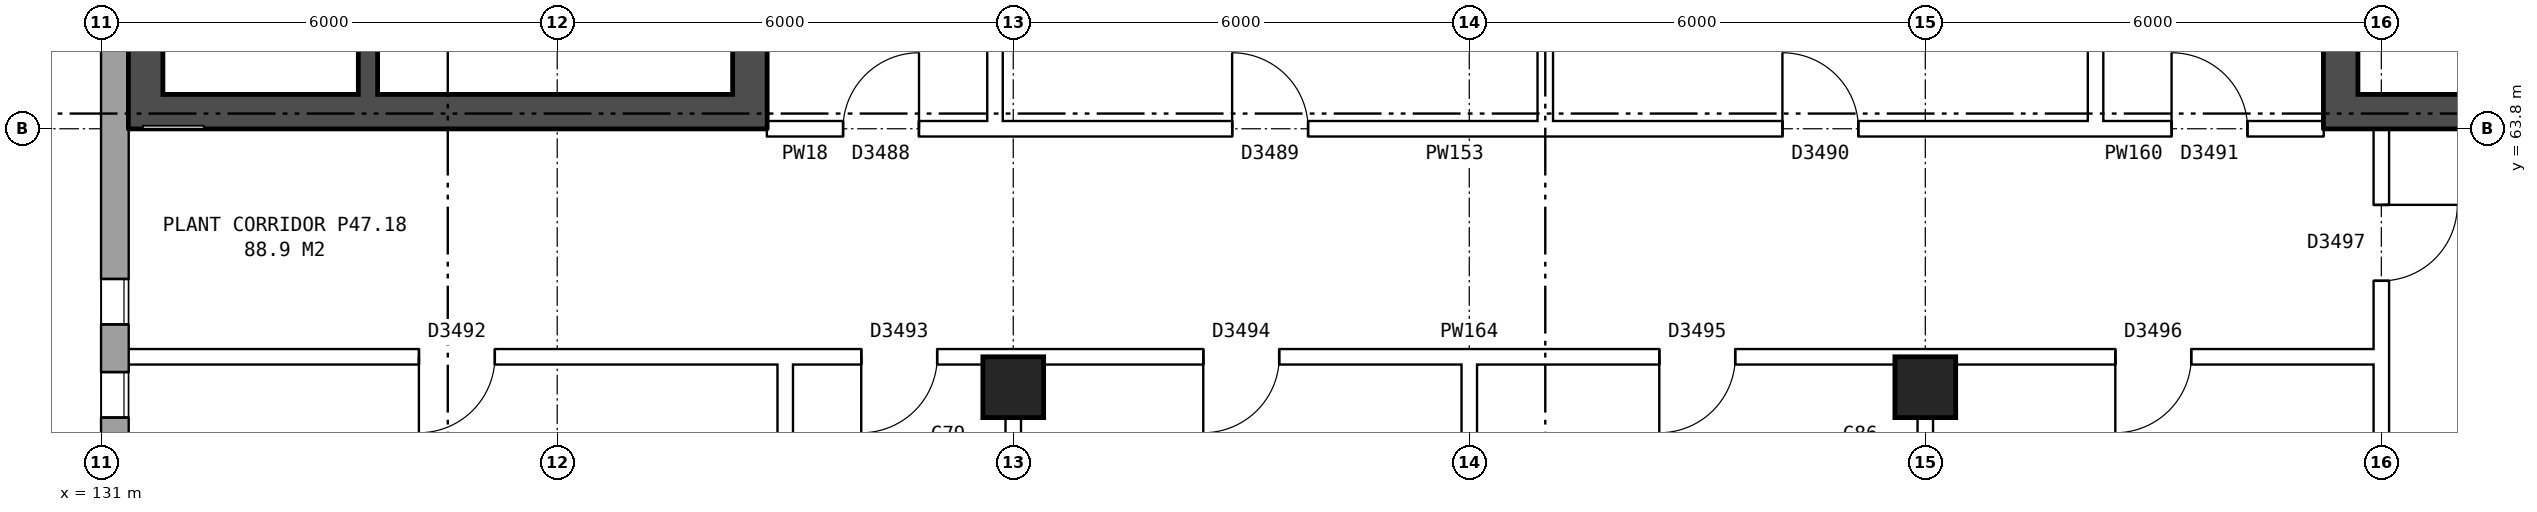
"""IFC4 building model, lengths in metres.
Left out: names, types, materials, properties, quantities, classifications, styles, units other than length and angle.
Written with IfcOpenShell. Run it as: python <this file> out.ifc"""

import sys

from ifc_helpers import new_model, si_unit, direction, frame, frame_2d, origin, origin_2d, place, context, subcontext, project, spatial, rectangle, extrude, element, fill, save


model = new_model("IFC4")
c1 = context("Model", 3, precision=1e-05, world=origin(), true_north=direction((0.0, 1.0)))
c2 = subcontext(c1, "Body", "Model", "MODEL_VIEW")
j1 = project(units=[si_unit("LENGTHUNIT", "METRE"), si_unit("PLANEANGLEUNIT", "RADIAN")], contexts=[c1])
p1 = place(None, origin())
s1 = spatial("IfcSite", under=j1, at=p1, CompositionType="ELEMENT")
p2 = place(p1, origin())
s2 = spatial("IfcBuilding", under=s1, at=p2, CompositionType="ELEMENT")
p3 = place(p2, frame((0.0, 0.0, 167.1)))
s3 = spatial("IfcBuildingStorey", under=s2, at=p3, CompositionType="ELEMENT", Elevation=167.1)
for number, where, z_axis, x_axis in (
    (1, (143.0, 60.4, 0.0), (0.0, 0.0, 1.0), (1.0, 0.0, 0.0)),
    (2, (155.0, 60.4, 0.0), (0.0, 0.0, 1.0), (1.0, 0.0, 0.0)),
):
    element("IfcColumn", number, at=place(p3, frame(where, z_axis=z_axis, x_axis=x_axis)), inside=s3, PredefinedType="COLUMN", context=c2, shape_type="SweptSolid", body=[
        extrude(rectangle(XDim=0.8, YDim=0.8, at=origin_2d()), origin(), (0.0, 0.0, 1.0), 4.2),
    ])
p4 = place(p3, frame((131.18, 82.925, 0.0), z_axis=(0.0, 0.0, 1.0), x_axis=(0.0, -1.0, 0.0)))
e3 = element("IfcWall", 3, at=p4, inside=s3, PredefinedType="STANDARD", context=c2, shape_type="SweptSolid", body=[
    extrude(rectangle(XDim=25.851, YDim=0.36, at=frame_2d((12.925, 0.0))), origin(), (0.0, 0.0, 1.0), 4.2),
])
p5 = place(p4, frame((2.9, 0.0, 1.5)))
e4 = element("IfcOpeningElement", 4, at=p5, cuts=e3, PredefinedType="OPENING", context=c2, shape_type="SweptSolid", body=[
    extrude(rectangle(XDim=0.6, YDim=1.2, at=frame_2d((0.3, 0.6))), frame((0.0, 0.19, 0.0), z_axis=(0.0, -1.0, 0.0), x_axis=(1.0, 0.0, 0.0)), (0.0, 0.0, 1.0), 0.38),
])
p6 = place(p4, frame((4.625, 0.0, 1.5)))
e5 = element("IfcOpeningElement", 5, at=p6, cuts=e3, PredefinedType="OPENING", context=c2, shape_type="SweptSolid", body=[
    extrude(rectangle(XDim=1.6, YDim=1.2, at=frame_2d((0.8, 0.6))), frame((0.0, 0.19, 0.0), z_axis=(0.0, -1.0, 0.0), x_axis=(1.0, 0.0, 0.0)), (0.0, 0.0, 1.0), 0.38),
])
p7 = place(p4, frame((21.1, 0.0, 1.5)))
e6 = element("IfcOpeningElement", 6, at=p7, cuts=e3, PredefinedType="OPENING", context=c2, shape_type="SweptSolid", body=[
    extrude(rectangle(XDim=0.6, YDim=1.2, at=frame_2d((0.3, 0.6))), frame((0.0, 0.19, 0.0), z_axis=(0.0, -1.0, 0.0), x_axis=(1.0, 0.0, 0.0)), (0.0, 0.0, 1.0), 0.38),
])
p8 = place(p4, frame((22.325, 0.0, 1.5)))
e7 = element("IfcOpeningElement", 7, at=p8, cuts=e3, PredefinedType="OPENING", context=c2, shape_type="SweptSolid", body=[
    extrude(rectangle(XDim=0.6, YDim=1.2, at=frame_2d((0.3, 0.6))), frame((0.0, 0.19, 0.0), z_axis=(0.0, -1.0, 0.0), x_axis=(1.0, 0.0, 0.0)), (0.0, 0.0, 1.0), 0.38),
])
p9 = place(p3, frame((139.535, 63.8, 0.0), z_axis=(0.0, 0.0, 1.0), x_axis=(0.0, 1.0, 0.0)))
e8 = element("IfcWall", 8, at=p9, inside=s3, PredefinedType="SHEAR", context=c2, shape_type="SweptSolid", body=[
    extrude(rectangle(XDim=12.4, YDim=0.45, at=frame_2d((6.2, 0.0))), origin(), (0.0, 0.0, 1.0), 4.2),
])
p10 = place(p9, frame((1.325, 0.0, 0.0)))
e9 = element("IfcOpeningElement", 9, at=p10, cuts=e8, PredefinedType="OPENING", context=c2, shape_type="SweptSolid", body=[
    extrude(rectangle(XDim=1.1, YDim=2.1, at=frame_2d((0.55, 1.05))), frame((0.0, 0.235, 0.0), z_axis=(0.0, -1.0, 0.0), x_axis=(1.0, 0.0, 0.0)), (0.0, 0.0, 1.0), 0.47),
])
p11 = place(p9, frame((3.6, 0.0, 0.0)))
e10 = element("IfcOpeningElement", 10, at=p11, cuts=e8, PredefinedType="OPENING", context=c2, shape_type="SweptSolid", body=[
    extrude(rectangle(XDim=1.1, YDim=2.1, at=frame_2d((0.55, 1.05))), frame((0.0, 0.235, 0.0), z_axis=(0.0, -1.0, 0.0), x_axis=(1.0, 0.0, 0.0)), (0.0, 0.0, 1.0), 0.47),
])
p12 = place(p9, frame((5.8, 0.0, 0.0)))
e11 = element("IfcOpeningElement", 11, at=p12, cuts=e8, PredefinedType="OPENING", context=c2, shape_type="SweptSolid", body=[
    extrude(rectangle(XDim=1.1, YDim=2.1, at=frame_2d((0.55, 1.05))), frame((0.0, 0.235, 0.0), z_axis=(0.0, -1.0, 0.0), x_axis=(1.0, 0.0, 0.0)), (0.0, 0.0, 1.0), 0.47),
])
p13 = place(p9, frame((9.9, 0.0, 0.0)))
e12 = element("IfcOpeningElement", 12, at=p13, cuts=e8, PredefinedType="OPENING", context=c2, shape_type="SweptSolid", body=[
    extrude(rectangle(XDim=1.1, YDim=2.1, at=frame_2d((0.55, 1.05))), frame((0.0, 0.235, 0.0), z_axis=(0.0, -1.0, 0.0), x_axis=(1.0, 0.0, 0.0)), (0.0, 0.0, 1.0), 0.47),
])
p14 = place(p9, frame((8.125, 0.0, 0.0)))
e13 = element("IfcOpeningElement", 13, at=p14, cuts=e8, PredefinedType="OPENING", context=c2, shape_type="SweptSolid", body=[
    extrude(rectangle(XDim=0.85, YDim=2.1, at=frame_2d((0.425, 1.05))), frame((0.0, 0.235, 0.0), z_axis=(0.0, -1.0, 0.0), x_axis=(1.0, 0.0, 0.0)), (0.0, 0.0, 1.0), 0.47),
])
p15 = place(p3, frame((131.585, 63.8, 0.0), z_axis=(0.0, 0.0, 1.0), x_axis=(0.0, 1.0, 0.0)))
e14 = element("IfcWall", 14, at=p15, inside=s3, PredefinedType="SHEAR", context=c2, shape_type="SweptSolid", body=[
    extrude(rectangle(XDim=12.4, YDim=0.45, at=frame_2d((6.2, 0.0))), origin(), (0.0, 0.0, 1.0), 4.2),
])
p16 = place(p3, frame((139.31, 64.025, 0.0), z_axis=(0.0, 0.0, 1.0), x_axis=(-1.0, 0.0, 0.0)))
e15 = element("IfcWall", 15, at=p16, inside=s3, PredefinedType="SHEAR", context=c2, shape_type="SweptSolid", body=[
    extrude(rectangle(XDim=7.5, YDim=0.45, at=frame_2d((3.75, 0.0))), origin(), (0.0, 0.0, 1.0), 4.2),
])
p17 = place(p3, frame((134.51, 64.25, 0.0), z_axis=(0.0, 0.0, 1.0), x_axis=(0.0, 1.0, 0.0)))
e16 = element("IfcWall", 16, at=p17, inside=s3, PredefinedType="SHEAR", context=c2, shape_type="SweptSolid", body=[
    extrude(rectangle(XDim=6.875, YDim=0.25, at=frame_2d((3.438, 0.0))), origin(), (0.0, 0.0, 1.0), 4.2),
])
p18 = place(p3, frame((142.76, 63.9, 0.0), z_axis=(0.0, 0.0, 1.0), x_axis=(0.0, 1.0, 0.0)))
e17 = element("IfcWall", 17, at=p18, inside=s3, PredefinedType="PARTITIONING", context=c2, shape_type="SweptSolid", body=[
    extrude(rectangle(XDim=12.2, YDim=0.2, at=frame_2d((6.1, 0.0))), origin(), (0.0, 0.0, 1.0), 4.2),
])
p19 = place(p18, frame((5.1, 0.0, 0.0)))
e18 = element("IfcOpeningElement", 18, at=p19, cuts=e17, PredefinedType="OPENING", context=c2, shape_type="SweptSolid", body=[
    extrude(rectangle(XDim=2.0, YDim=2.1, at=frame_2d((1.0, 1.05))), frame((0.0, 0.11, 0.0), z_axis=(0.0, -1.0, 0.0), x_axis=(1.0, 0.0, 0.0)), (0.0, 0.0, 1.0), 0.22),
])
p20 = place(p3, frame((160.465, 76.2, 0.0), z_axis=(0.0, 0.0, 1.0), x_axis=(0.0, -1.0, 0.0)))
e19 = element("IfcWall", 19, at=p20, inside=s3, PredefinedType="SHEAR", context=c2, shape_type="SweptSolid", body=[
    extrude(rectangle(XDim=12.4, YDim=0.45, at=frame_2d((6.2, 0.0))), origin(), (0.0, 0.0, 1.0), 4.2),
])
p21 = place(p20, frame((1.325, 0.0, 0.0)))
e20 = element("IfcOpeningElement", 20, at=p21, cuts=e19, PredefinedType="OPENING", context=c2, shape_type="SweptSolid", body=[
    extrude(rectangle(XDim=1.1, YDim=2.1, at=frame_2d((0.55, 1.05))), frame((0.0, 0.235, 0.0), z_axis=(0.0, -1.0, 0.0), x_axis=(1.0, 0.0, 0.0)), (0.0, 0.0, 1.0), 0.47),
])
p22 = place(p20, frame((4.025, 0.0, 0.0)))
e21 = element("IfcOpeningElement", 21, at=p22, cuts=e19, PredefinedType="OPENING", context=c2, shape_type="SweptSolid", body=[
    extrude(rectangle(XDim=0.85, YDim=2.1, at=frame_2d((0.425, 1.05))), frame((0.0, 0.235, 0.0), z_axis=(0.0, -1.0, 0.0), x_axis=(1.0, 0.0, 0.0)), (0.0, 0.0, 1.0), 0.47),
])
p23 = place(p20, frame((6.175, 0.0, 0.0)))
e22 = element("IfcOpeningElement", 22, at=p23, cuts=e19, PredefinedType="OPENING", context=c2, shape_type="SweptSolid", body=[
    extrude(rectangle(XDim=0.85, YDim=2.1, at=frame_2d((0.425, 1.05))), frame((0.0, 0.235, 0.0), z_axis=(0.0, -1.0, 0.0), x_axis=(1.0, 0.0, 0.0)), (0.0, 0.0, 1.0), 0.47),
])
p24 = place(p20, frame((9.9, 0.0, 0.0)))
e23 = element("IfcOpeningElement", 23, at=p24, cuts=e19, PredefinedType="OPENING", context=c2, shape_type="SweptSolid", body=[
    extrude(rectangle(XDim=1.1, YDim=2.1, at=frame_2d((0.55, 1.05))), frame((0.0, 0.235, 0.0), z_axis=(0.0, -1.0, 0.0), x_axis=(1.0, 0.0, 0.0)), (0.0, 0.0, 1.0), 0.47),
])
p25 = place(p20, frame((8.125, 0.0, 0.0)))
e24 = element("IfcOpeningElement", 24, at=p25, cuts=e19, PredefinedType="OPENING", context=c2, shape_type="SweptSolid", body=[
    extrude(rectangle(XDim=0.85, YDim=2.1, at=frame_2d((0.425, 1.05))), frame((0.0, 0.235, 0.0), z_axis=(0.0, -1.0, 0.0), x_axis=(1.0, 0.0, 0.0)), (0.0, 0.0, 1.0), 0.47),
])
p26 = place(p3, frame((160.69, 64.025, 0.0), z_axis=(0.0, 0.0, 1.0), x_axis=(1.0, 0.0, 0.0)))
e25 = element("IfcWall", 25, at=p26, inside=s3, PredefinedType="SHEAR", context=c2, shape_type="SweptSolid", body=[
    extrude(rectangle(XDim=7.5, YDim=0.45, at=frame_2d((3.75, 0.0))), origin(), (0.0, 0.0, 1.0), 4.2),
])
p27 = place(p3, frame((157.24, 63.9, 0.0), z_axis=(0.0, 0.0, 1.0), x_axis=(0.0, 1.0, 0.0)))
e26 = element("IfcWall", 26, at=p27, inside=s3, PredefinedType="PARTITIONING", context=c2, shape_type="SweptSolid", body=[
    extrude(rectangle(XDim=12.2, YDim=0.2, at=frame_2d((6.1, 0.0))), origin(), (0.0, 0.0, 1.0), 4.2),
])
p28 = place(p27, frame((5.1, 0.0, 0.0)))
e27 = element("IfcOpeningElement", 27, at=p28, cuts=e26, PredefinedType="OPENING", context=c2, shape_type="SweptSolid", body=[
    extrude(rectangle(XDim=2.0, YDim=2.1, at=frame_2d((1.0, 1.05))), frame((0.0, 0.11, 0.0), z_axis=(0.0, -1.0, 0.0), x_axis=(1.0, 0.0, 0.0)), (0.0, 0.0, 1.0), 0.22),
])
p29 = place(p3, frame((131.24, 60.8, 0.0), z_axis=(0.0, 0.0, 1.0), x_axis=(1.0, 0.0, 0.0)))
e28 = element("IfcWall", 28, at=p29, inside=s3, PredefinedType="PARTITIONING", context=c2, shape_type="SweptSolid", body=[
    extrude(rectangle(XDim=29.86, YDim=0.2, at=frame_2d((14.93, 0.0))), origin(), (0.0, 0.0, 1.0), 4.2),
])
p30 = place(p29, frame((3.94, 0.0, 0.0)))
e29 = element("IfcOpeningElement", 29, at=p30, cuts=e28, PredefinedType="OPENING", context=c2, shape_type="SweptSolid", body=[
    extrude(rectangle(XDim=1.0, YDim=2.1, at=frame_2d((0.5, 1.05))), frame((0.0, 0.11, 0.0), z_axis=(0.0, -1.0, 0.0), x_axis=(1.0, 0.0, 0.0)), (0.0, 0.0, 1.0), 0.22),
])
p31 = place(p29, frame((9.76, 0.0, 0.0)))
e30 = element("IfcOpeningElement", 30, at=p31, cuts=e28, PredefinedType="OPENING", context=c2, shape_type="SweptSolid", body=[
    extrude(rectangle(XDim=1.0, YDim=2.1, at=frame_2d((0.5, 1.05))), frame((0.0, 0.11, 0.0), z_axis=(0.0, -1.0, 0.0), x_axis=(1.0, 0.0, 0.0)), (0.0, 0.0, 1.0), 0.22),
])
p32 = place(p29, frame((14.26, 0.0, 0.0)))
e31 = element("IfcOpeningElement", 31, at=p32, cuts=e28, PredefinedType="OPENING", context=c2, shape_type="SweptSolid", body=[
    extrude(rectangle(XDim=1.0, YDim=2.1, at=frame_2d((0.5, 1.05))), frame((0.0, 0.11, 0.0), z_axis=(0.0, -1.0, 0.0), x_axis=(1.0, 0.0, 0.0)), (0.0, 0.0, 1.0), 0.22),
])
p33 = place(p29, frame((20.26, 0.0, 0.0)))
e32 = element("IfcOpeningElement", 32, at=p33, cuts=e28, PredefinedType="OPENING", context=c2, shape_type="SweptSolid", body=[
    extrude(rectangle(XDim=1.0, YDim=2.1, at=frame_2d((0.5, 1.05))), frame((0.0, 0.11, 0.0), z_axis=(0.0, -1.0, 0.0), x_axis=(1.0, 0.0, 0.0)), (0.0, 0.0, 1.0), 0.22),
])
p34 = place(p29, frame((26.26, 0.0, 0.0)))
e33 = element("IfcOpeningElement", 33, at=p34, cuts=e28, PredefinedType="OPENING", context=c2, shape_type="SweptSolid", body=[
    extrude(rectangle(XDim=1.0, YDim=2.1, at=frame_2d((0.5, 1.05))), frame((0.0, 0.11, 0.0), z_axis=(0.0, -1.0, 0.0), x_axis=(1.0, 0.0, 0.0)), (0.0, 0.0, 1.0), 0.22),
])
p35 = place(p3, frame((142.76, 63.8, 0.0), z_axis=(0.0, 0.0, 1.0), x_axis=(1.0, 0.0, 0.0)))
e34 = element("IfcWall", 34, at=p35, inside=s3, PredefinedType="PARTITIONING", context=c2, shape_type="SweptSolid", body=[
    extrude(rectangle(XDim=14.48, YDim=0.2, at=frame_2d((7.24, 0.0))), origin(), (0.0, 0.0, 1.0), 4.2),
])
p36 = place(p35, frame((3.12, 0.0, 0.0)))
e35 = element("IfcOpeningElement", 35, at=p36, cuts=e34, PredefinedType="OPENING", context=c2, shape_type="SweptSolid", body=[
    extrude(rectangle(XDim=1.0, YDim=2.1, at=frame_2d((0.5, 1.05))), frame((0.0, 0.11, 0.0), z_axis=(0.0, -1.0, 0.0), x_axis=(1.0, 0.0, 0.0)), (0.0, 0.0, 1.0), 0.22),
])
p37 = place(p35, frame((10.36, 0.0, 0.0)))
e36 = element("IfcOpeningElement", 36, at=p37, cuts=e34, PredefinedType="OPENING", context=c2, shape_type="SweptSolid", body=[
    extrude(rectangle(XDim=1.0, YDim=2.1, at=frame_2d((0.5, 1.05))), frame((0.0, 0.11, 0.0), z_axis=(0.0, -1.0, 0.0), x_axis=(1.0, 0.0, 0.0)), (0.0, 0.0, 1.0), 0.22),
])
p38 = place(p3, frame((139.76, 63.8, 0.0), z_axis=(0.0, 0.0, 1.0), x_axis=(1.0, 0.0, 0.0)))
e37 = element("IfcWall", 37, at=p38, inside=s3, PredefinedType="PARTITIONING", context=c2, shape_type="SweptSolid", body=[
    extrude(rectangle(XDim=3.0, YDim=0.2, at=frame_2d((1.5, 0.0))), origin(), (0.0, 0.0, 1.0), 4.2),
])
p39 = place(p38, frame((1.0, 0.0, 0.0)))
e38 = element("IfcOpeningElement", 38, at=p39, cuts=e37, PredefinedType="OPENING", context=c2, shape_type="SweptSolid", body=[
    extrude(rectangle(XDim=1.0, YDim=2.1, at=frame_2d((0.5, 1.05))), frame((0.0, 0.11, 0.0), z_axis=(0.0, -1.0, 0.0), x_axis=(1.0, 0.0, 0.0)), (0.0, 0.0, 1.0), 0.22),
])
p40 = place(p3, frame((157.24, 63.8, 0.0), z_axis=(0.0, 0.0, 1.0), x_axis=(1.0, 0.0, 0.0)))
e39 = element("IfcWall", 39, at=p40, inside=s3, PredefinedType="PARTITIONING", context=c2, shape_type="SweptSolid", body=[
    extrude(rectangle(XDim=3.0, YDim=0.2, at=frame_2d((1.5, 0.0))), origin(), (0.0, 0.0, 1.0), 4.2),
])
p41 = place(p40, frame((1.0, 0.0, 0.0)))
e40 = element("IfcOpeningElement", 40, at=p41, cuts=e39, PredefinedType="OPENING", context=c2, shape_type="SweptSolid", body=[
    extrude(rectangle(XDim=1.0, YDim=2.1, at=frame_2d((0.5, 1.05))), frame((0.0, 0.11, 0.0), z_axis=(0.0, -1.0, 0.0), x_axis=(1.0, 0.0, 0.0)), (0.0, 0.0, 1.0), 0.22),
])
for number, where, z_axis, x_axis in (
    (41, (140.0, 54.24, 0.0), (0.0, 0.0, 1.0), (0.0, 1.0, 0.0)),
    (42, (143.0, 54.24, 0.0), (0.0, 0.0, 1.0), (0.0, 1.0, 0.0)),
    (43, (149.0, 54.24, 0.0), (0.0, 0.0, 1.0), (0.0, 1.0, 0.0)),
):
    element("IfcWall", number, at=place(p3, frame(where, z_axis=z_axis, x_axis=x_axis)), inside=s3, PredefinedType="PARTITIONING", context=c2, shape_type="SweptSolid", body=[
        extrude(rectangle(XDim=6.66, YDim=0.2, at=frame_2d((3.33, 0.0))), origin(), (0.0, 0.0, 1.0), 4.2),
    ])
p42 = place(p3, frame((150.0, 63.7, 0.0), z_axis=(0.0, 0.0, 1.0), x_axis=(0.0, 1.0, 0.0)))
e44 = element("IfcWall", 44, at=p42, inside=s3, PredefinedType="PARTITIONING", context=c2, shape_type="SweptSolid", body=[
    extrude(rectangle(XDim=5.2, YDim=0.2, at=frame_2d((2.6, 0.0))), origin(), (0.0, 0.0, 1.0), 4.2),
])
p43 = place(p3, frame((155.0, 54.24, 0.0), z_axis=(0.0, 0.0, 1.0), x_axis=(0.0, 1.0, 0.0)))
e45 = element("IfcWall", 45, at=p43, inside=s3, PredefinedType="PARTITIONING", context=c2, shape_type="SweptSolid", body=[
    extrude(rectangle(XDim=6.66, YDim=0.2, at=frame_2d((3.33, 0.0))), origin(), (0.0, 0.0, 1.0), 4.2),
])
p44 = place(p3, frame((161.0, 54.24, 0.0), z_axis=(0.0, 0.0, 1.0), x_axis=(0.0, 1.0, 0.0)))
e46 = element("IfcWall", 46, at=p44, inside=s3, PredefinedType="PARTITIONING", context=c2, shape_type="SweptSolid", body=[
    extrude(rectangle(XDim=9.56, YDim=0.2, at=frame_2d((4.78, 0.0))), origin(), (0.0, 0.0, 1.0), 4.2),
])
p45 = place(p44, frame((7.559, 0.0, 0.0)))
e47 = element("IfcOpeningElement", 47, at=p45, cuts=e46, PredefinedType="OPENING", context=c2, shape_type="SweptSolid", body=[
    extrude(rectangle(XDim=1.0, YDim=2.1, at=frame_2d((0.5, 1.05))), frame((0.0, 0.11, 0.0), z_axis=(0.0, -1.0, 0.0), x_axis=(1.0, 0.0, 0.0)), (0.0, 0.0, 1.0), 0.22),
])
p46 = place(p7, origin())
e48 = element("IfcWindow", 48, at=p46, inside=s3, PartitioningType="DOUBLE_PANEL_HORIZONTAL", PredefinedType="WINDOW", context=c2, shape_type="SweptSolid", body=[
    extrude(rectangle(XDim=0.6, YDim=1.2, at=frame_2d((0.3, 0.6))), frame((0.0, 0.15, 0.0), z_axis=(0.0, -1.0, 0.0), x_axis=(1.0, 0.0, 0.0)), (0.0, 0.0, 1.0), 0.06),
])
fill(e6, e48)
p47 = place(p8, origin())
e49 = element("IfcWindow", 49, at=p47, inside=s3, PartitioningType="DOUBLE_PANEL_HORIZONTAL", PredefinedType="WINDOW", context=c2, shape_type="SweptSolid", body=[
    extrude(rectangle(XDim=0.6, YDim=1.2, at=frame_2d((0.3, 0.6))), frame((0.0, 0.15, 0.0), z_axis=(0.0, -1.0, 0.0), x_axis=(1.0, 0.0, 0.0)), (0.0, 0.0, 1.0), 0.06),
])
fill(e7, e49)
p48 = place(p30, frame((1.0, 0.0, 0.0), z_axis=(0.0, 0.0, 1.0), x_axis=(-1.0, 0.0, 0.0)))
e50 = element("IfcDoor", 50, at=p48, inside=s3, OperationType="SINGLE_SWING_RIGHT", PredefinedType="DOOR", context=c2, shape_type="SweptSolid", body=[
    extrude(rectangle(XDim=1.0, YDim=2.1, at=frame_2d((0.5, 1.05))), frame((0.0, 0.025, 0.0), z_axis=(0.0, -1.0, 0.0), x_axis=(1.0, 0.0, 0.0)), (0.0, 0.0, 1.0), 0.05),
])
fill(e29, e50)
p49 = place(p31, frame((1.0, 0.0, 0.0), z_axis=(0.0, 0.0, 1.0), x_axis=(-1.0, 0.0, 0.0)))
e51 = element("IfcDoor", 51, at=p49, inside=s3, OperationType="SINGLE_SWING_RIGHT", PredefinedType="DOOR", context=c2, shape_type="SweptSolid", body=[
    extrude(rectangle(XDim=1.0, YDim=2.1, at=frame_2d((0.5, 1.05))), frame((0.0, 0.025, 0.0), z_axis=(0.0, -1.0, 0.0), x_axis=(1.0, 0.0, 0.0)), (0.0, 0.0, 1.0), 0.05),
])
fill(e30, e51)
p50 = place(p32, frame((1.0, 0.0, 0.0), z_axis=(0.0, 0.0, 1.0), x_axis=(-1.0, 0.0, 0.0)))
e52 = element("IfcDoor", 52, at=p50, inside=s3, OperationType="SINGLE_SWING_RIGHT", PredefinedType="DOOR", context=c2, shape_type="SweptSolid", body=[
    extrude(rectangle(XDim=1.0, YDim=2.1, at=frame_2d((0.5, 1.05))), frame((0.0, 0.025, 0.0), z_axis=(0.0, -1.0, 0.0), x_axis=(1.0, 0.0, 0.0)), (0.0, 0.0, 1.0), 0.05),
])
fill(e31, e52)
p51 = place(p33, frame((1.0, 0.0, 0.0), z_axis=(0.0, 0.0, 1.0), x_axis=(-1.0, 0.0, 0.0)))
e53 = element("IfcDoor", 53, at=p51, inside=s3, OperationType="SINGLE_SWING_RIGHT", PredefinedType="DOOR", context=c2, shape_type="SweptSolid", body=[
    extrude(rectangle(XDim=1.0, YDim=2.1, at=frame_2d((0.5, 1.05))), frame((0.0, 0.025, 0.0), z_axis=(0.0, -1.0, 0.0), x_axis=(1.0, 0.0, 0.0)), (0.0, 0.0, 1.0), 0.05),
])
fill(e32, e53)
p52 = place(p34, frame((1.0, 0.0, 0.0), z_axis=(0.0, 0.0, 1.0), x_axis=(-1.0, 0.0, 0.0)))
e54 = element("IfcDoor", 54, at=p52, inside=s3, OperationType="SINGLE_SWING_RIGHT", PredefinedType="DOOR", context=c2, shape_type="SweptSolid", body=[
    extrude(rectangle(XDim=1.0, YDim=2.1, at=frame_2d((0.5, 1.05))), frame((0.0, 0.025, 0.0), z_axis=(0.0, -1.0, 0.0), x_axis=(1.0, 0.0, 0.0)), (0.0, 0.0, 1.0), 0.05),
])
fill(e33, e54)
p53 = place(p36, origin())
e55 = element("IfcDoor", 55, at=p53, inside=s3, OperationType="SINGLE_SWING_LEFT", PredefinedType="DOOR", context=c2, shape_type="SweptSolid", body=[
    extrude(rectangle(XDim=1.0, YDim=2.1, at=frame_2d((0.5, 1.05))), frame((0.0, 0.025, 0.0), z_axis=(0.0, -1.0, 0.0), x_axis=(1.0, 0.0, 0.0)), (0.0, 0.0, 1.0), 0.05),
])
fill(e35, e55)
p54 = place(p37, origin())
e56 = element("IfcDoor", 56, at=p54, inside=s3, OperationType="SINGLE_SWING_LEFT", PredefinedType="DOOR", context=c2, shape_type="SweptSolid", body=[
    extrude(rectangle(XDim=1.0, YDim=2.1, at=frame_2d((0.5, 1.05))), frame((0.0, 0.025, 0.0), z_axis=(0.0, -1.0, 0.0), x_axis=(1.0, 0.0, 0.0)), (0.0, 0.0, 1.0), 0.05),
])
fill(e36, e56)
p55 = place(p39, origin())
e57 = element("IfcDoor", 57, at=p55, inside=s3, OperationType="SINGLE_SWING_RIGHT", PredefinedType="DOOR", context=c2, shape_type="SweptSolid", body=[
    extrude(rectangle(XDim=1.0, YDim=2.1, at=frame_2d((0.5, 1.05))), frame((0.0, 0.025, 0.0), z_axis=(0.0, -1.0, 0.0), x_axis=(1.0, 0.0, 0.0)), (0.0, 0.0, 1.0), 0.05),
])
fill(e38, e57)
p56 = place(p41, origin())
e58 = element("IfcDoor", 58, at=p56, inside=s3, OperationType="SINGLE_SWING_LEFT", PredefinedType="DOOR", context=c2, shape_type="SweptSolid", body=[
    extrude(rectangle(XDim=1.0, YDim=2.1, at=frame_2d((0.5, 1.05))), frame((0.0, 0.025, 0.0), z_axis=(0.0, -1.0, 0.0), x_axis=(1.0, 0.0, 0.0)), (0.0, 0.0, 1.0), 0.05),
])
fill(e40, e58)
p57 = place(p45, frame((1.0, 0.0, 0.0), z_axis=(0.0, 0.0, 1.0), x_axis=(-1.0, 0.0, 0.0)))
e59 = element("IfcDoor", 59, at=p57, inside=s3, OperationType="SINGLE_SWING_LEFT", PredefinedType="DOOR", context=c2, shape_type="SweptSolid", body=[
    extrude(rectangle(XDim=1.0, YDim=2.1, at=frame_2d((0.5, 1.05))), frame((0.0, 0.025, 0.0), z_axis=(0.0, -1.0, 0.0), x_axis=(1.0, 0.0, 0.0)), (0.0, 0.0, 1.0), 0.05),
])
fill(e47, e59)
save(model, sys.argv[1])
